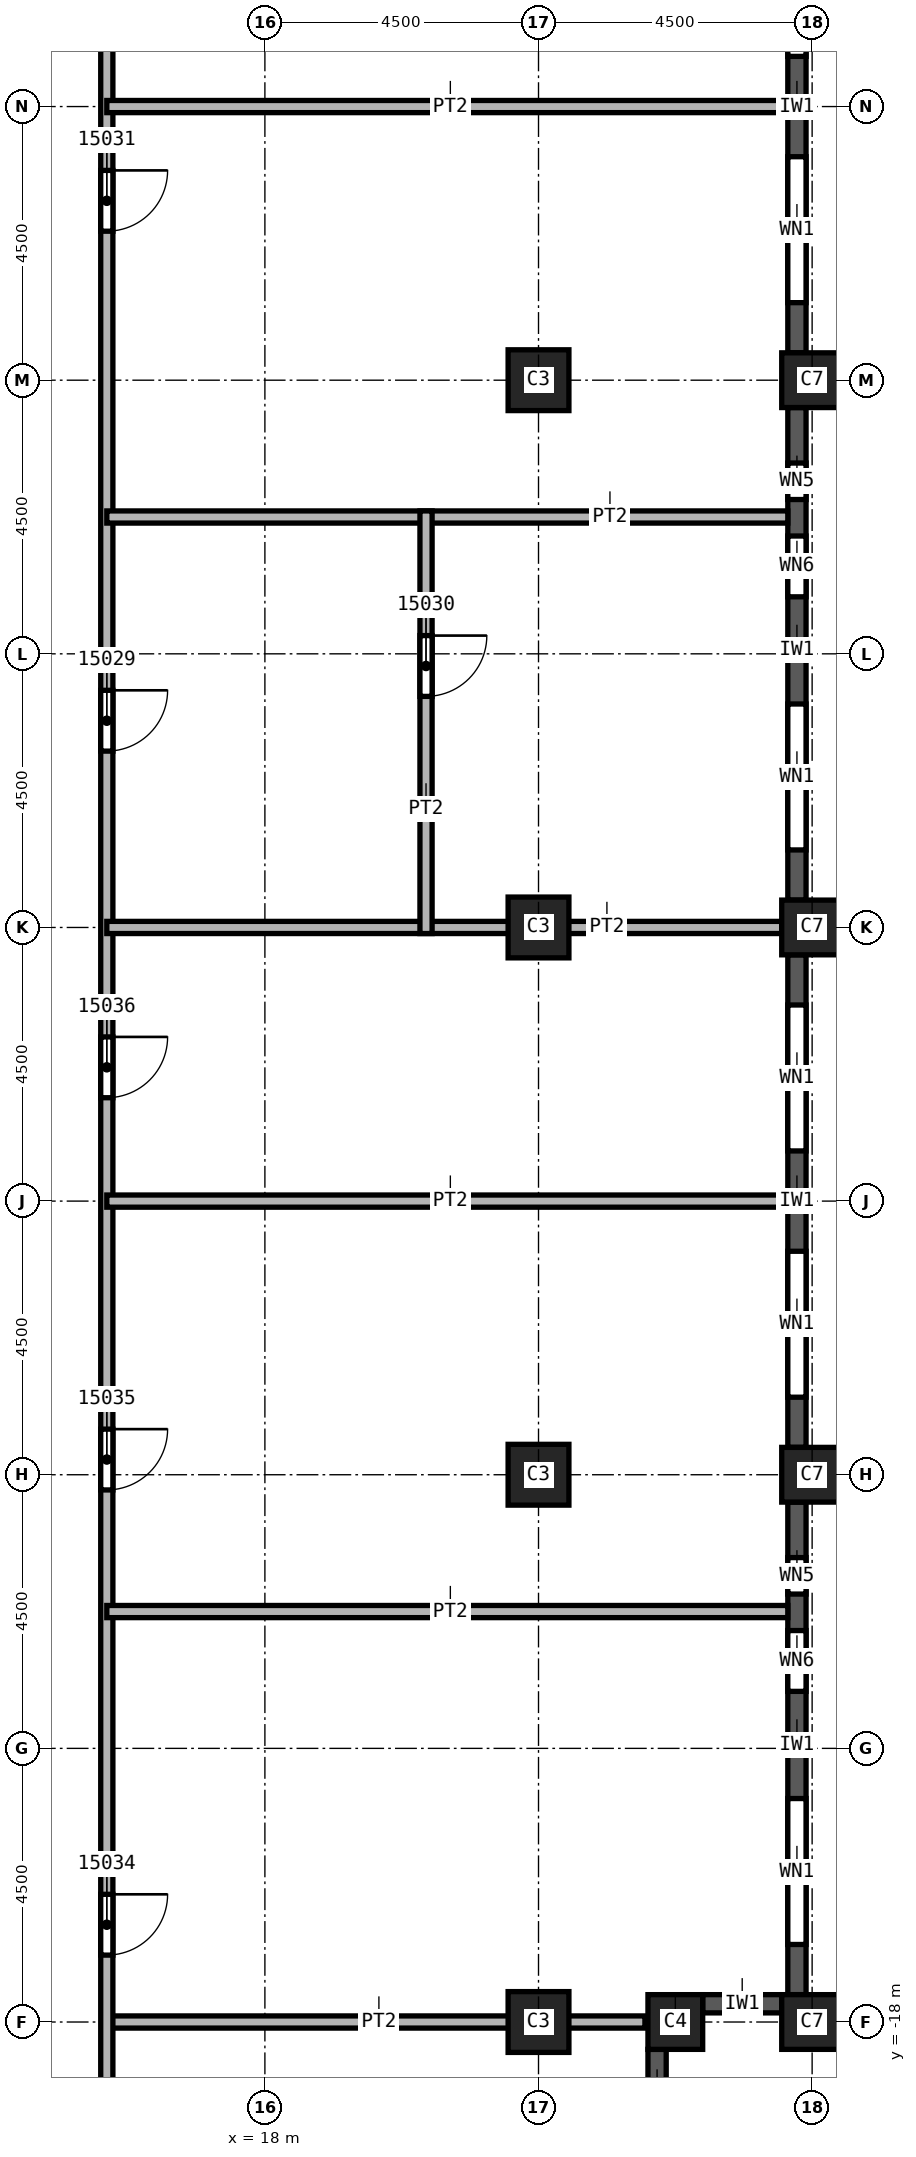
"""IFC4 building model, lengths in metres.
Left out: names, types, materials, properties, quantities, classifications, styles, units other than length and angle.
Written with IfcOpenShell. Run it as: python <this file> out.ifc"""

import sys

from ifc_helpers import new_model, si_unit, direction, frame, frame_2d, origin, origin_2d, place, context, subcontext, project, spatial, rectangle, extrude, element, fill, save


model = new_model("IFC4")
c1 = context("Model", 3, precision=1e-05, world=origin(), true_north=direction((0.0, 1.0)))
c2 = subcontext(c1, "Body", "Model", "MODEL_VIEW")
j1 = project(units=[si_unit("LENGTHUNIT", "METRE"), si_unit("PLANEANGLEUNIT", "RADIAN")], contexts=[c1])
p1 = place(None, origin())
s1 = spatial("IfcSite", under=j1, at=p1, CompositionType="ELEMENT")
p2 = place(p1, origin())
s2 = spatial("IfcBuilding", under=s1, at=p2, CompositionType="ELEMENT")
p3 = place(p2, frame((0.0, 0.0, 228.0)))
s3 = spatial("IfcBuildingStorey", under=s2, at=p3, CompositionType="ELEMENT", Elevation=228.0)
for number, where, z_axis, x_axis in (
    (1, (22.5, 0.0, 0.0), (0.0, 0.0, 1.0), (1.0, 0.0, 0.0)),
    (2, (22.5, 9.0, 0.0), (0.0, 0.0, 1.0), (1.0, 0.0, 0.0)),
    (3, (22.5, -9.0, 0.0), (0.0, 0.0, 1.0), (1.0, 0.0, 0.0)),
    (4, (22.5, -18.0, 0.0), (0.0, 0.0, 1.0), (1.0, 0.0, 0.0)),
):
    element("IfcColumn", number, at=place(p3, frame(where, z_axis=z_axis, x_axis=x_axis)), inside=s3, PredefinedType="COLUMN", context=c2, shape_type="SweptSolid", body=[
        extrude(rectangle(XDim=1.0, YDim=1.0, at=origin_2d()), origin(), (0.0, 0.0, 1.0), 3.72),
    ])
for number, where, z_axis, x_axis in (
    (5, (27.0, 0.0, 0.0), (0.0, 0.0, 1.0), (0.0, 1.0, 0.0)),
    (6, (27.0, 9.0, 0.0), (0.0, 0.0, 1.0), (0.0, 1.0, 0.0)),
    (7, (27.0, -9.0, 0.0), (0.0, 0.0, 1.0), (0.0, 1.0, 0.0)),
    (8, (27.0, -18.0, 0.0), (0.0, 0.0, 1.0), (0.0, 1.0, 0.0)),
):
    element("IfcColumn", number, at=place(p3, frame(where, z_axis=z_axis, x_axis=x_axis)), inside=s3, PredefinedType="COLUMN", context=c2, shape_type="SweptSolid", body=[
        extrude(rectangle(XDim=0.9, YDim=1.0, at=origin_2d()), origin(), (0.0, 0.0, 1.0), 3.72),
    ])
p4 = place(p3, frame((24.75, -18.0, 0.0), z_axis=(0.0, 0.0, 1.0), x_axis=(1.0, 0.0, 0.0)))
e9 = element("IfcColumn", 9, at=p4, inside=s3, PredefinedType="COLUMN", context=c2, shape_type="SweptSolid", body=[
    extrude(rectangle(XDim=0.9, YDim=0.9, at=origin_2d()), origin(), (0.0, 0.0, 1.0), 3.72),
])
p5 = place(p3, frame((24.45, -19.95, 0.0), z_axis=(0.0, 0.0, 1.0), x_axis=(0.0, 1.0, 0.0)))
e10 = element("IfcWall", 10, at=p5, inside=s3, PredefinedType="SOLIDWALL", context=c2, shape_type="SweptSolid", body=[
    extrude(rectangle(XDim=1.5, YDim=0.3, at=frame_2d((0.75, 0.0))), origin(), (0.0, 0.0, 1.0), 3.12),
])
p6 = place(p3, frame((25.2, -17.7, 0.0), z_axis=(0.0, 0.0, 1.0), x_axis=(1.0, 0.0, 0.0)))
e11 = element("IfcWall", 11, at=p6, inside=s3, PredefinedType="SOLIDWALL", context=c2, shape_type="SweptSolid", body=[
    extrude(rectangle(XDim=1.3, YDim=0.3, at=frame_2d((0.65, 0.0))), origin(), (0.0, 0.0, 1.0), 3.12),
])
p7 = place(p3, frame((26.75, -17.55, 0.0), z_axis=(0.0, 0.0, 1.0), x_axis=(0.0, 1.0, 0.0)))
e12 = element("IfcWall", 12, at=p7, inside=s3, PredefinedType="SOLIDWALL", context=c2, shape_type="SweptSolid", body=[
    extrude(rectangle(XDim=8.1, YDim=0.3, at=frame_2d((4.05, 0.0))), origin(), (0.0, 0.0, 1.0), 3.12),
])
p8 = place(p7, frame((0.825, 0.0, 0.8)))
e13 = element("IfcOpeningElement", 13, at=p8, cuts=e12, PredefinedType="OPENING", context=c2, shape_type="SweptSolid", body=[
    extrude(rectangle(XDim=2.4, YDim=1.95, at=frame_2d((1.2, 0.975))), frame((0.0, 0.15, 0.0), z_axis=(0.0, -1.0, 0.0), x_axis=(1.0, 0.0, 0.0)), (0.0, 0.0, 1.0), 0.3),
])
p9 = place(p7, frame((4.988, 0.0, 0.8)))
e14 = element("IfcOpeningElement", 14, at=p9, cuts=e12, PredefinedType="OPENING", context=c2, shape_type="SweptSolid", body=[
    extrude(rectangle(XDim=1.0, YDim=1.95, at=frame_2d((0.5, 0.975))), frame((0.0, 0.15, 0.0), z_axis=(0.0, -1.0, 0.0), x_axis=(1.0, 0.0, 0.0)), (0.0, 0.0, 1.0), 0.3),
])
p10 = place(p7, frame((6.587, 0.0, 0.8)))
e15 = element("IfcOpeningElement", 15, at=p10, cuts=e12, PredefinedType="OPENING", context=c2, shape_type="SweptSolid", body=[
    extrude(rectangle(XDim=0.6, YDim=1.95, at=frame_2d((0.3, 0.975))), frame((0.0, 0.15, 0.0), z_axis=(0.0, -1.0, 0.0), x_axis=(1.0, 0.0, 0.0)), (0.0, 0.0, 1.0), 0.3),
])
p11 = place(p3, frame((26.75, -8.55, 0.0), z_axis=(0.0, 0.0, 1.0), x_axis=(0.0, 1.0, 0.0)))
e16 = element("IfcWall", 16, at=p11, inside=s3, PredefinedType="SOLIDWALL", context=c2, shape_type="SweptSolid", body=[
    extrude(rectangle(XDim=8.1, YDim=0.3, at=frame_2d((4.05, 0.0))), origin(), (0.0, 0.0, 1.0), 3.12),
])
p12 = place(p11, frame((0.825, 0.0, 0.8)))
e17 = element("IfcOpeningElement", 17, at=p12, cuts=e16, PredefinedType="OPENING", context=c2, shape_type="SweptSolid", body=[
    extrude(rectangle(XDim=2.4, YDim=1.95, at=frame_2d((1.2, 0.975))), frame((0.0, 0.15, 0.0), z_axis=(0.0, -1.0, 0.0), x_axis=(1.0, 0.0, 0.0)), (0.0, 0.0, 1.0), 0.3),
])
p13 = place(p11, frame((4.875, 0.0, 0.8)))
e18 = element("IfcOpeningElement", 18, at=p13, cuts=e16, PredefinedType="OPENING", context=c2, shape_type="SweptSolid", body=[
    extrude(rectangle(XDim=2.4, YDim=1.95, at=frame_2d((1.2, 0.975))), frame((0.0, 0.15, 0.0), z_axis=(0.0, -1.0, 0.0), x_axis=(1.0, 0.0, 0.0)), (0.0, 0.0, 1.0), 0.3),
])
p14 = place(p3, frame((26.75, 0.45, 0.0), z_axis=(0.0, 0.0, 1.0), x_axis=(0.0, 1.0, 0.0)))
e19 = element("IfcWall", 19, at=p14, inside=s3, PredefinedType="SOLIDWALL", context=c2, shape_type="SweptSolid", body=[
    extrude(rectangle(XDim=8.1, YDim=0.3, at=frame_2d((4.05, 0.0))), origin(), (0.0, 0.0, 1.0), 3.12),
])
p15 = place(p14, frame((0.825, 0.0, 0.8)))
e20 = element("IfcOpeningElement", 20, at=p15, cuts=e19, PredefinedType="OPENING", context=c2, shape_type="SweptSolid", body=[
    extrude(rectangle(XDim=2.4, YDim=1.95, at=frame_2d((1.2, 0.975))), frame((0.0, 0.15, 0.0), z_axis=(0.0, -1.0, 0.0), x_axis=(1.0, 0.0, 0.0)), (0.0, 0.0, 1.0), 0.3),
])
p16 = place(p14, frame((4.988, 0.0, 0.8)))
e21 = element("IfcOpeningElement", 21, at=p16, cuts=e19, PredefinedType="OPENING", context=c2, shape_type="SweptSolid", body=[
    extrude(rectangle(XDim=1.0, YDim=1.95, at=frame_2d((0.5, 0.975))), frame((0.0, 0.15, 0.0), z_axis=(0.0, -1.0, 0.0), x_axis=(1.0, 0.0, 0.0)), (0.0, 0.0, 1.0), 0.3),
])
p17 = place(p14, frame((6.587, 0.0, 0.8)))
e22 = element("IfcOpeningElement", 22, at=p17, cuts=e19, PredefinedType="OPENING", context=c2, shape_type="SweptSolid", body=[
    extrude(rectangle(XDim=0.6, YDim=1.95, at=frame_2d((0.3, 0.975))), frame((0.0, 0.15, 0.0), z_axis=(0.0, -1.0, 0.0), x_axis=(1.0, 0.0, 0.0)), (0.0, 0.0, 1.0), 0.3),
])
p18 = place(p3, frame((26.75, 9.45, 0.0), z_axis=(0.0, 0.0, 1.0), x_axis=(0.0, 1.0, 0.0)))
e23 = element("IfcWall", 23, at=p18, inside=s3, PredefinedType="SOLIDWALL", context=c2, shape_type="SweptSolid", body=[
    extrude(rectangle(XDim=8.1, YDim=0.3, at=frame_2d((4.05, 0.0))), origin(), (0.0, 0.0, 1.0), 3.12),
])
p19 = place(p18, frame((0.825, 0.0, 0.8)))
e24 = element("IfcOpeningElement", 24, at=p19, cuts=e23, PredefinedType="OPENING", context=c2, shape_type="SweptSolid", body=[
    extrude(rectangle(XDim=2.4, YDim=1.95, at=frame_2d((1.2, 0.975))), frame((0.0, 0.15, 0.0), z_axis=(0.0, -1.0, 0.0), x_axis=(1.0, 0.0, 0.0)), (0.0, 0.0, 1.0), 0.3),
])
p20 = place(p18, frame((4.875, 0.0, 0.8)))
e25 = element("IfcOpeningElement", 25, at=p20, cuts=e23, PredefinedType="OPENING", context=c2, shape_type="SweptSolid", body=[
    extrude(rectangle(XDim=2.4, YDim=1.95, at=frame_2d((1.2, 0.975))), frame((0.0, 0.15, 0.0), z_axis=(0.0, -1.0, 0.0), x_axis=(1.0, 0.0, 0.0)), (0.0, 0.0, 1.0), 0.3),
])
p21 = place(p3, frame((15.4, -18.0, 0.0), z_axis=(0.0, 0.0, 1.0), x_axis=(1.0, 0.0, 0.0)))
e26 = element("IfcWall", 26, at=p21, inside=s3, PredefinedType="PARTITIONING", context=c2, shape_type="SweptSolid", body=[
    extrude(rectangle(XDim=8.85, YDim=0.2, at=frame_2d((4.425, 0.0))), origin(), (0.0, 0.0, 1.0), 3.72),
])
p22 = place(p3, frame((15.4, 22.4, 0.0), z_axis=(0.0, 0.0, 1.0), x_axis=(0.0, -1.0, 0.0)))
e27 = element("IfcWall", 27, at=p22, inside=s3, PredefinedType="PARTITIONING", context=c2, shape_type="SweptSolid", body=[
    extrude(rectangle(XDim=44.8, YDim=0.2, at=frame_2d((22.4, 0.0))), origin(), (0.0, 0.0, 1.0), 3.72),
])
p23 = place(p22, frame((18.5, 0.0, 0.0)))
e28 = element("IfcOpeningElement", 28, at=p23, cuts=e27, PredefinedType="OPENING", context=c2, shape_type="SweptSolid", body=[
    extrude(rectangle(XDim=1.0, YDim=2.1, at=frame_2d((0.5, 1.05))), frame((0.0, 0.1, 0.0), z_axis=(0.0, -1.0, 0.0), x_axis=(1.0, 0.0, 0.0)), (0.0, 0.0, 1.0), 0.2),
])
p24 = place(p22, frame((9.95, 0.0, 0.0)))
e29 = element("IfcOpeningElement", 29, at=p24, cuts=e27, PredefinedType="OPENING", context=c2, shape_type="SweptSolid", body=[
    extrude(rectangle(XDim=1.0, YDim=2.1, at=frame_2d((0.5, 1.05))), frame((0.0, 0.1, 0.0), z_axis=(0.0, -1.0, 0.0), x_axis=(1.0, 0.0, 0.0)), (0.0, 0.0, 1.0), 0.2),
])
p25 = place(p22, frame((1.3, 0.0, 0.0)))
e30 = element("IfcOpeningElement", 30, at=p25, cuts=e27, PredefinedType="OPENING", context=c2, shape_type="SweptSolid", body=[
    extrude(rectangle(XDim=1.0, YDim=2.1, at=frame_2d((0.5, 1.05))), frame((0.0, 0.1, 0.0), z_axis=(0.0, -1.0, 0.0), x_axis=(1.0, 0.0, 0.0)), (0.0, 0.0, 1.0), 0.2),
])
p26 = place(p22, frame((43.55, 0.0, 0.0)))
e31 = element("IfcOpeningElement", 31, at=p26, cuts=e27, PredefinedType="OPENING", context=c2, shape_type="SweptSolid", body=[
    extrude(rectangle(XDim=1.0, YDim=2.1, at=frame_2d((0.5, 1.05))), frame((0.0, 0.1, 0.0), z_axis=(0.0, -1.0, 0.0), x_axis=(1.0, 0.0, 0.0)), (0.0, 0.0, 1.0), 0.2),
])
p27 = place(p22, frame((38.3, 0.0, 0.0)))
e32 = element("IfcOpeningElement", 32, at=p27, cuts=e27, PredefinedType="OPENING", context=c2, shape_type="SweptSolid", body=[
    extrude(rectangle(XDim=1.0, YDim=2.1, at=frame_2d((0.5, 1.05))), frame((0.0, 0.1, 0.0), z_axis=(0.0, -1.0, 0.0), x_axis=(1.0, 0.0, 0.0)), (0.0, 0.0, 1.0), 0.2),
])
p28 = place(p22, frame((30.65, 0.0, 0.0)))
e33 = element("IfcOpeningElement", 33, at=p28, cuts=e27, PredefinedType="OPENING", context=c2, shape_type="SweptSolid", body=[
    extrude(rectangle(XDim=1.0, YDim=2.1, at=frame_2d((0.5, 1.05))), frame((0.0, 0.1, 0.0), z_axis=(0.0, -1.0, 0.0), x_axis=(1.0, 0.0, 0.0)), (0.0, 0.0, 1.0), 0.2),
])
p29 = place(p22, frame((24.2, 0.0, 0.0)))
e34 = element("IfcOpeningElement", 34, at=p29, cuts=e27, PredefinedType="OPENING", context=c2, shape_type="SweptSolid", body=[
    extrude(rectangle(XDim=1.0, YDim=2.1, at=frame_2d((0.5, 1.05))), frame((0.0, 0.1, 0.0), z_axis=(0.0, -1.0, 0.0), x_axis=(1.0, 0.0, 0.0)), (0.0, 0.0, 1.0), 0.2),
])
for number, where, z_axis, x_axis in (
    (35, (15.4, -11.25, 0.0), (0.0, 0.0, 1.0), (1.0, 0.0, 0.0)),
    (36, (15.4, -4.5, 0.0), (0.0, 0.0, 1.0), (1.0, 0.0, 0.0)),
    (37, (15.4, 6.75, 0.0), (0.0, 0.0, 1.0), (1.0, 0.0, 0.0)),
    (38, (15.4, 13.5, 0.0), (0.0, 0.0, 1.0), (1.0, 0.0, 0.0)),
):
    element("IfcWall", number, at=place(p3, frame(where, z_axis=z_axis, x_axis=x_axis)), inside=s3, PredefinedType="PARTITIONING", context=c2, shape_type="SweptSolid", body=[
        extrude(rectangle(XDim=11.2, YDim=0.2, at=frame_2d((5.6, 0.0))), origin(), (0.0, 0.0, 1.0), 3.72),
    ])
p30 = place(p3, frame((26.5, 0.0, 0.0), z_axis=(0.0, 0.0, 1.0), x_axis=(-1.0, 0.0, 0.0)))
e39 = element("IfcWall", 39, at=p30, inside=s3, PredefinedType="PARTITIONING", context=c2, shape_type="SweptSolid", body=[
    extrude(rectangle(XDim=11.1, YDim=0.2, at=frame_2d((5.55, 0.0))), origin(), (0.0, 0.0, 1.0), 3.72),
])
p31 = place(p3, frame((20.65, 6.85, 0.0), z_axis=(0.0, 0.0, 1.0), x_axis=(0.0, -1.0, 0.0)))
e40 = element("IfcWall", 40, at=p31, inside=s3, PredefinedType="PARTITIONING", context=c2, shape_type="SweptSolid", body=[
    extrude(rectangle(XDim=6.95, YDim=0.2, at=frame_2d((3.475, 0.0))), origin(), (0.0, 0.0, 1.0), 3.72),
])
p32 = place(p31, frame((2.05, 0.0, 0.0)))
e41 = element("IfcOpeningElement", 41, at=p32, cuts=e40, PredefinedType="OPENING", context=c2, shape_type="SweptSolid", body=[
    extrude(rectangle(XDim=1.0, YDim=2.1, at=frame_2d((0.5, 1.05))), frame((0.0, 0.1, 0.0), z_axis=(0.0, -1.0, 0.0), x_axis=(1.0, 0.0, 0.0)), (0.0, 0.0, 1.0), 0.2),
])
p33 = place(p8, origin())
e42 = element("IfcWindow", 42, at=p33, inside=s3, PartitioningType="SINGLE_PANEL", PredefinedType="WINDOW", context=c2, shape_type="SweptSolid", body=[
    extrude(rectangle(XDim=2.4, YDim=1.95, at=frame_2d((1.2, 0.975))), frame((0.0, 0.03, 0.0), z_axis=(0.0, -1.0, 0.0), x_axis=(1.0, 0.0, 0.0)), (0.0, 0.0, 1.0), 0.06),
])
fill(e13, e42)
p34 = place(p12, origin())
e43 = element("IfcWindow", 43, at=p34, inside=s3, PartitioningType="SINGLE_PANEL", PredefinedType="WINDOW", context=c2, shape_type="SweptSolid", body=[
    extrude(rectangle(XDim=2.4, YDim=1.95, at=frame_2d((1.2, 0.975))), frame((0.0, 0.03, 0.0), z_axis=(0.0, -1.0, 0.0), x_axis=(1.0, 0.0, 0.0)), (0.0, 0.0, 1.0), 0.06),
])
fill(e17, e43)
p35 = place(p13, origin())
e44 = element("IfcWindow", 44, at=p35, inside=s3, PartitioningType="SINGLE_PANEL", PredefinedType="WINDOW", context=c2, shape_type="SweptSolid", body=[
    extrude(rectangle(XDim=2.4, YDim=1.95, at=frame_2d((1.2, 0.975))), frame((0.0, 0.03, 0.0), z_axis=(0.0, -1.0, 0.0), x_axis=(1.0, 0.0, 0.0)), (0.0, 0.0, 1.0), 0.06),
])
fill(e18, e44)
p36 = place(p15, origin())
e45 = element("IfcWindow", 45, at=p36, inside=s3, PartitioningType="SINGLE_PANEL", PredefinedType="WINDOW", context=c2, shape_type="SweptSolid", body=[
    extrude(rectangle(XDim=2.4, YDim=1.95, at=frame_2d((1.2, 0.975))), frame((0.0, 0.03, 0.0), z_axis=(0.0, -1.0, 0.0), x_axis=(1.0, 0.0, 0.0)), (0.0, 0.0, 1.0), 0.06),
])
fill(e20, e45)
p37 = place(p19, origin())
e46 = element("IfcWindow", 46, at=p37, inside=s3, PartitioningType="SINGLE_PANEL", PredefinedType="WINDOW", context=c2, shape_type="SweptSolid", body=[
    extrude(rectangle(XDim=2.4, YDim=1.95, at=frame_2d((1.2, 0.975))), frame((0.0, 0.03, 0.0), z_axis=(0.0, -1.0, 0.0), x_axis=(1.0, 0.0, 0.0)), (0.0, 0.0, 1.0), 0.06),
])
fill(e24, e46)
p38 = place(p20, origin())
e47 = element("IfcWindow", 47, at=p38, inside=s3, PartitioningType="SINGLE_PANEL", PredefinedType="WINDOW", context=c2, shape_type="SweptSolid", body=[
    extrude(rectangle(XDim=2.4, YDim=1.95, at=frame_2d((1.2, 0.975))), frame((0.0, 0.03, 0.0), z_axis=(0.0, -1.0, 0.0), x_axis=(1.0, 0.0, 0.0)), (0.0, 0.0, 1.0), 0.06),
])
fill(e25, e47)
p39 = place(p23, origin())
e48 = element("IfcDoor", 48, at=p39, inside=s3, OperationType="SINGLE_SWING_RIGHT", PredefinedType="DOOR", context=c2, shape_type="SweptSolid", body=[
    extrude(rectangle(XDim=1.0, YDim=2.1, at=frame_2d((0.5, 1.05))), frame((0.0, 0.025, 0.0), z_axis=(0.0, -1.0, 0.0), x_axis=(1.0, 0.0, 0.0)), (0.0, 0.0, 1.0), 0.05),
])
fill(e28, e48)
p40 = place(p32, origin())
e49 = element("IfcDoor", 49, at=p40, inside=s3, OperationType="SINGLE_SWING_LEFT", PredefinedType="DOOR", context=c2, shape_type="SweptSolid", body=[
    extrude(rectangle(XDim=1.0, YDim=2.1, at=frame_2d((0.5, 1.05))), frame((0.0, 0.025, 0.0), z_axis=(0.0, -1.0, 0.0), x_axis=(1.0, 0.0, 0.0)), (0.0, 0.0, 1.0), 0.05),
])
fill(e41, e49)
p41 = place(p24, origin())
e50 = element("IfcDoor", 50, at=p41, inside=s3, OperationType="SINGLE_SWING_RIGHT", PredefinedType="DOOR", context=c2, shape_type="SweptSolid", body=[
    extrude(rectangle(XDim=1.0, YDim=2.1, at=frame_2d((0.5, 1.05))), frame((0.0, 0.025, 0.0), z_axis=(0.0, -1.0, 0.0), x_axis=(1.0, 0.0, 0.0)), (0.0, 0.0, 1.0), 0.05),
])
fill(e29, e50)
p42 = place(p27, origin())
e51 = element("IfcDoor", 51, at=p42, inside=s3, OperationType="SINGLE_SWING_LEFT", PredefinedType="DOOR", context=c2, shape_type="SweptSolid", body=[
    extrude(rectangle(XDim=1.0, YDim=2.1, at=frame_2d((0.5, 1.05))), frame((0.0, 0.025, 0.0), z_axis=(0.0, -1.0, 0.0), x_axis=(1.0, 0.0, 0.0)), (0.0, 0.0, 1.0), 0.05),
])
fill(e32, e51)
p43 = place(p28, origin())
e52 = element("IfcDoor", 52, at=p43, inside=s3, OperationType="SINGLE_SWING_RIGHT", PredefinedType="DOOR", context=c2, shape_type="SweptSolid", body=[
    extrude(rectangle(XDim=1.0, YDim=2.1, at=frame_2d((0.5, 1.05))), frame((0.0, 0.025, 0.0), z_axis=(0.0, -1.0, 0.0), x_axis=(1.0, 0.0, 0.0)), (0.0, 0.0, 1.0), 0.05),
])
fill(e33, e52)
p44 = place(p29, origin())
e53 = element("IfcDoor", 53, at=p44, inside=s3, OperationType="SINGLE_SWING_LEFT", PredefinedType="DOOR", context=c2, shape_type="SweptSolid", body=[
    extrude(rectangle(XDim=1.0, YDim=2.1, at=frame_2d((0.5, 1.05))), frame((0.0, 0.025, 0.0), z_axis=(0.0, -1.0, 0.0), x_axis=(1.0, 0.0, 0.0)), (0.0, 0.0, 1.0), 0.05),
])
fill(e34, e53)
p45 = place(p9, origin())
e54 = element("IfcWindow", 54, at=p45, inside=s3, PartitioningType="SINGLE_PANEL", PredefinedType="WINDOW", context=c2, shape_type="SweptSolid", body=[
    extrude(rectangle(XDim=1.0, YDim=1.95, at=frame_2d((0.5, 0.975))), frame((0.0, 0.03, 0.0), z_axis=(0.0, -1.0, 0.0), x_axis=(1.0, 0.0, 0.0)), (0.0, 0.0, 1.0), 0.06),
])
fill(e14, e54)
p46 = place(p10, origin())
e55 = element("IfcWindow", 55, at=p46, inside=s3, PartitioningType="SINGLE_PANEL", PredefinedType="WINDOW", context=c2, shape_type="SweptSolid", body=[
    extrude(rectangle(XDim=0.6, YDim=1.95, at=frame_2d((0.3, 0.975))), frame((0.0, 0.03, 0.0), z_axis=(0.0, -1.0, 0.0), x_axis=(1.0, 0.0, 0.0)), (0.0, 0.0, 1.0), 0.06),
])
fill(e15, e55)
p47 = place(p16, origin())
e56 = element("IfcWindow", 56, at=p47, inside=s3, PartitioningType="SINGLE_PANEL", PredefinedType="WINDOW", context=c2, shape_type="SweptSolid", body=[
    extrude(rectangle(XDim=1.0, YDim=1.95, at=frame_2d((0.5, 0.975))), frame((0.0, 0.03, 0.0), z_axis=(0.0, -1.0, 0.0), x_axis=(1.0, 0.0, 0.0)), (0.0, 0.0, 1.0), 0.06),
])
fill(e21, e56)
p48 = place(p17, origin())
e57 = element("IfcWindow", 57, at=p48, inside=s3, PartitioningType="SINGLE_PANEL", PredefinedType="WINDOW", context=c2, shape_type="SweptSolid", body=[
    extrude(rectangle(XDim=0.6, YDim=1.95, at=frame_2d((0.3, 0.975))), frame((0.0, 0.03, 0.0), z_axis=(0.0, -1.0, 0.0), x_axis=(1.0, 0.0, 0.0)), (0.0, 0.0, 1.0), 0.06),
])
fill(e22, e57)
save(model, sys.argv[1])
